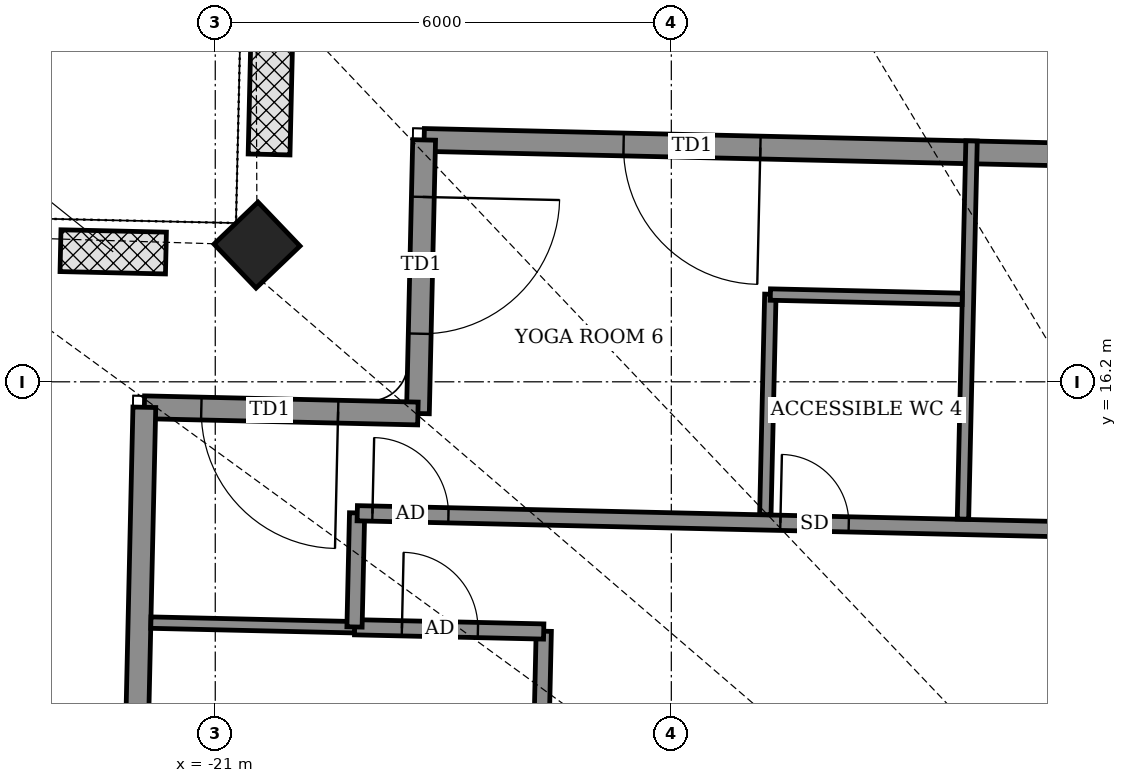
"""IFC4 building model, lengths in metres.
Left out: names, types, materials, properties, quantities, classifications, styles, units other than length and angle.
Written with IfcOpenShell. Run it as: python <this file> out.ifc"""

import sys

from ifc_helpers import new_model, si_unit, direction, frame, frame_2d, origin, origin_2d, place, context, subcontext, project, spatial, rectangle, extrude, element, fill, save


model = new_model("IFC4")
c1 = context("Model", 3, precision=1e-05, world=origin(), true_north=direction((0.0, 1.0)))
c2 = subcontext(c1, "Body", "Model", "MODEL_VIEW")
j1 = project(units=[si_unit("LENGTHUNIT", "METRE"), si_unit("PLANEANGLEUNIT", "RADIAN")], contexts=[c1])
p1 = place(None, origin())
s1 = spatial("IfcSite", under=j1, at=p1, CompositionType="ELEMENT")
p2 = place(p1, origin())
s2 = spatial("IfcBuilding", under=s1, at=p2, CompositionType="ELEMENT")
p3 = place(p2, frame((0.0, 0.0, 346.1)))
s3 = spatial("IfcBuildingStorey", under=s2, at=p3, CompositionType="ELEMENT", Elevation=346.1)
p4 = place(p3, frame((-20.451, 17.999, -0.55), z_axis=(0.0, 0.0, 1.0), x_axis=(-0.722928727453, -0.690922611457, 0.0)))
e1 = element("IfcColumn", 1, at=p4, inside=s3, PredefinedType="COLUMN", context=c2, shape_type="SweptSolid", body=[
    extrude(rectangle(XDim=0.8, YDim=0.8, at=origin_2d()), origin(), (0.0, 0.0, 1.0), 4.6),
])
p5 = place(p3, frame((23.537, 18.434, 0.0), z_axis=(0.0, 0.0, 1.0), x_axis=(-0.999742787513, 0.022679480066, 0.0)))
e2 = element("IfcWall", 2, at=p5, inside=s3, PredefinedType="SOLIDWALL", context=c2, shape_type="SweptSolid", body=[
    extrude(rectangle(XDim=41.8, YDim=0.3, at=frame_2d((20.9, 0.0))), origin(), (0.0, 0.0, 1.0), 2.65),
])
p6 = place(p5, frame((3.0, 0.0, 0.0)))
e3 = element("IfcOpeningElement", 3, at=p6, cuts=e2, PredefinedType="OPENING", context=c2, shape_type="SweptSolid", body=[
    extrude(rectangle(XDim=1.8, YDim=2.4, at=frame_2d((0.9, 1.2))), frame((0.0, 0.16, 0.0), z_axis=(0.0, -1.0, 0.0), x_axis=(1.0, 0.0, 0.0)), (0.0, 0.0, 1.0), 0.32),
])
p7 = place(p5, frame((10.325, 0.0, 0.0)))
e4 = element("IfcOpeningElement", 4, at=p7, cuts=e2, PredefinedType="OPENING", context=c2, shape_type="SweptSolid", body=[
    extrude(rectangle(XDim=1.8, YDim=2.4, at=frame_2d((0.9, 1.2))), frame((0.0, 0.16, 0.0), z_axis=(0.0, -1.0, 0.0), x_axis=(1.0, 0.0, 0.0)), (0.0, 0.0, 1.0), 0.32),
])
p8 = place(p5, frame((18.025, 0.0, 0.0)))
e5 = element("IfcOpeningElement", 5, at=p8, cuts=e2, PredefinedType="OPENING", context=c2, shape_type="SweptSolid", body=[
    extrude(rectangle(XDim=1.8, YDim=2.4, at=frame_2d((0.9, 1.2))), frame((0.0, 0.16, 0.0), z_axis=(0.0, -1.0, 0.0), x_axis=(1.0, 0.0, 0.0)), (0.0, 0.0, 1.0), 0.32),
])
p9 = place(p5, frame((24.025, 0.0, 0.0)))
e6 = element("IfcOpeningElement", 6, at=p9, cuts=e2, PredefinedType="OPENING", context=c2, shape_type="SweptSolid", body=[
    extrude(rectangle(XDim=1.8, YDim=2.4, at=frame_2d((0.9, 1.2))), frame((0.0, 0.16, 0.0), z_axis=(0.0, -1.0, 0.0), x_axis=(1.0, 0.0, 0.0)), (0.0, 0.0, 1.0), 0.32),
])
p10 = place(p5, frame((30.05, 0.0, 0.0)))
e7 = element("IfcOpeningElement", 7, at=p10, cuts=e2, PredefinedType="OPENING", context=c2, shape_type="SweptSolid", body=[
    extrude(rectangle(XDim=1.8, YDim=2.4, at=frame_2d((0.9, 1.2))), frame((0.0, 0.16, 0.0), z_axis=(0.0, -1.0, 0.0), x_axis=(1.0, 0.0, 0.0)), (0.0, 0.0, 1.0), 0.32),
])
p11 = place(p5, frame((37.375, 0.0, 0.0)))
e8 = element("IfcOpeningElement", 8, at=p11, cuts=e2, PredefinedType="OPENING", context=c2, shape_type="SweptSolid", body=[
    extrude(rectangle(XDim=1.8, YDim=2.4, at=frame_2d((0.9, 1.2))), frame((0.0, 0.16, 0.0), z_axis=(0.0, -1.0, 0.0), x_axis=(1.0, 0.0, 0.0)), (0.0, 0.0, 1.0), 0.32),
])
p12 = place(p3, frame((-18.252, 19.382, 0.0), z_axis=(0.0, 0.0, 1.0), x_axis=(-0.02278610514, -0.999740363001, 0.0)))
e9 = element("IfcWall", 9, at=p12, inside=s3, PredefinedType="SOLIDWALL", context=c2, shape_type="SweptSolid", body=[
    extrude(rectangle(XDim=3.6, YDim=0.3, at=frame_2d((1.8, 0.0))), origin(), (0.0, 0.0, 1.0), 2.65),
])
p13 = place(p12, frame((0.75, 0.0, 0.0)))
e10 = element("IfcOpeningElement", 10, at=p13, cuts=e9, PredefinedType="OPENING", context=c2, shape_type="SweptSolid", body=[
    extrude(rectangle(XDim=1.8, YDim=2.4, at=frame_2d((0.9, 1.2))), frame((0.0, 0.16, 0.0), z_axis=(0.0, -1.0, 0.0), x_axis=(1.0, 0.0, 0.0)), (0.0, 0.0, 1.0), 0.32),
])
p14 = place(p3, frame((-18.334, 15.783, 0.0), z_axis=(0.0, 0.0, 1.0), x_axis=(-0.999740363001, 0.02278610514, 0.0)))
e11 = element("IfcWall", 11, at=p14, inside=s3, PredefinedType="SOLIDWALL", context=c2, shape_type="SweptSolid", body=[
    extrude(rectangle(XDim=3.6, YDim=0.3, at=frame_2d((1.8, 0.0))), origin(), (0.0, 0.0, 1.0), 2.75),
])
p15 = place(p14, frame((1.05, 0.0, 0.0)))
e12 = element("IfcOpeningElement", 12, at=p15, cuts=e11, PredefinedType="OPENING", context=c2, shape_type="SweptSolid", body=[
    extrude(rectangle(XDim=1.8, YDim=2.4, at=frame_2d((0.9, 1.2))), frame((0.0, 0.16, 0.0), z_axis=(0.0, -1.0, 0.0), x_axis=(1.0, 0.0, 0.0)), (0.0, 0.0, 1.0), 0.32),
])
p16 = place(p3, frame((-21.933, 15.865, 0.0), z_axis=(0.0, 0.0, 1.0), x_axis=(-0.022653381007, -0.999743379237, 0.0)))
e13 = element("IfcWall", 13, at=p16, inside=s3, PredefinedType="SOLIDWALL", context=c2, shape_type="SweptSolid", body=[
    extrude(rectangle(XDim=6.93, YDim=0.3, at=frame_2d((3.465, 0.0))), origin(), (0.0, 0.0, 1.0), 2.75),
])
p17 = place(p16, frame((3.95, 0.0, 0.0)))
e14 = element("IfcOpeningElement", 14, at=p17, cuts=e13, PredefinedType="OPENING", context=c2, shape_type="SweptSolid", body=[
    extrude(rectangle(XDim=1.8, YDim=2.4, at=frame_2d((0.9, 1.2))), frame((0.0, 0.16, 0.0), z_axis=(0.0, -1.0, 0.0), x_axis=(1.0, 0.0, 0.0)), (0.0, 0.0, 1.0), 0.32),
])
p18 = place(p3, frame((-23.036, 17.925, 0.0), z_axis=(0.0, 0.0, 1.0), x_axis=(0.999750215708, -0.022349635169, 0.0)))
e15 = element("IfcWall", 15, at=p18, inside=s3, PredefinedType="USERDEFINED", context=c2, shape_type="SweptSolid", body=[
    extrude(rectangle(XDim=1.387, YDim=0.55, at=frame_2d((0.694, 0.0))), origin(), (0.0, 0.0, 1.0), 0.8),
])
p19 = place(p3, frame((-20.292, 19.191, 0.0), z_axis=(0.0, 0.0, 1.0), x_axis=(0.022929749512, 0.99973707873, 0.0)))
e16 = element("IfcWall", 16, at=p19, inside=s3, PredefinedType="USERDEFINED", context=c2, shape_type="SweptSolid", body=[
    extrude(rectangle(XDim=1.438, YDim=0.55, at=frame_2d((0.719, 0.0))), origin(), (0.0, 0.0, 1.0), 0.8),
])
p20 = place(p3, frame((-19.301, 21.642, 0.0), z_axis=(0.0, 0.0, 1.0), x_axis=(0.999742269674, -0.022702295639, 0.0)))
e17 = element("IfcWall", 17, at=p20, inside=s3, PredefinedType="USERDEFINED", context=c2, shape_type="SweptSolid", body=[
    extrude(rectangle(XDim=41.5, YDim=0.55, at=frame_2d((20.75, 0.0))), origin(), (0.0, 0.0, 1.0), 0.8),
])
p21 = place(p3, frame((-17.247, -12.149, 0.0), z_axis=(0.0, 0.0, 1.0), x_axis=(0.022696191528, 0.999742408268, 0.0)))
e18 = element("IfcWall", 18, at=p21, inside=s3, PredefinedType="PARTITIONING", context=c2, shape_type="SweptSolid", body=[
    extrude(rectangle(XDim=25.074, YDim=0.2, at=frame_2d((12.537, 0.0))), origin(), (0.0, 0.0, 1.0), 2.75),
])
p22 = place(p21, frame((17.425, 0.0, 0.0)))
e19 = element("IfcOpeningElement", 19, at=p22, cuts=e18, PredefinedType="OPENING", context=c2, shape_type="SweptSolid", body=[
    extrude(rectangle(XDim=1.0, YDim=2.1, at=frame_2d((0.5, 1.05))), frame((0.0, 0.11, 0.0), z_axis=(0.0, -1.0, 0.0), x_axis=(1.0, 0.0, 0.0)), (0.0, 0.0, 1.0), 0.22),
])
p23 = place(p21, frame((19.925, 0.0, 0.0)))
e20 = element("IfcOpeningElement", 20, at=p23, cuts=e18, PredefinedType="OPENING", context=c2, shape_type="SweptSolid", body=[
    extrude(rectangle(XDim=0.9, YDim=2.1, at=frame_2d((0.45, 1.05))), frame((0.0, 0.11, 0.0), z_axis=(0.0, -1.0, 0.0), x_axis=(1.0, 0.0, 0.0)), (0.0, 0.0, 1.0), 0.22),
])
p24 = place(p21, frame((12.175, 0.0, 0.0)))
e21 = element("IfcOpeningElement", 21, at=p24, cuts=e18, PredefinedType="OPENING", context=c2, shape_type="SweptSolid", body=[
    extrude(rectangle(XDim=1.0, YDim=2.1, at=frame_2d((0.5, 1.05))), frame((0.0, 0.11, 0.0), z_axis=(0.0, -1.0, 0.0), x_axis=(1.0, 0.0, 0.0)), (0.0, 0.0, 1.0), 0.22),
])
p25 = place(p21, frame((8.575, 0.0, 0.0)))
e22 = element("IfcOpeningElement", 22, at=p25, cuts=e18, PredefinedType="OPENING", context=c2, shape_type="SweptSolid", body=[
    extrude(rectangle(XDim=0.9, YDim=2.1, at=frame_2d((0.45, 1.05))), frame((0.0, 0.11, 0.0), z_axis=(0.0, -1.0, 0.0), x_axis=(1.0, 0.0, 0.0)), (0.0, 0.0, 1.0), 0.22),
])
p26 = place(p21, frame((4.259, 0.0, 0.0)))
e23 = element("IfcOpeningElement", 23, at=p26, cuts=e18, PredefinedType="OPENING", context=c2, shape_type="SweptSolid", body=[
    extrude(rectangle(XDim=1.0, YDim=2.1, at=frame_2d((0.5, 1.05))), frame((0.0, 0.11, 0.0), z_axis=(0.0, -1.0, 0.0), x_axis=(1.0, 0.0, 0.0)), (0.0, 0.0, 1.0), 0.22),
])
p27 = place(p3, frame((-21.847, 13.032, 0.0), z_axis=(0.0, 0.0, 1.0), x_axis=(0.999741694725, -0.022727600589, 0.0)))
e24 = element("IfcWall", 24, at=p27, inside=s3, PredefinedType="PARTITIONING", context=c2, shape_type="SweptSolid", body=[
    extrude(rectangle(XDim=2.686, YDim=0.15, at=frame_2d((1.343, 0.0))), origin(), (0.0, 0.0, 1.0), 4.05),
])
p28 = place(p3, frame((-19.166, 12.971, 0.0), z_axis=(0.0, 0.0, 1.0), x_axis=(0.999747428818, -0.022473953195, 0.0)))
e25 = element("IfcWall", 25, at=p28, inside=s3, PredefinedType="PARTITIONING", context=c2, shape_type="SweptSolid", body=[
    extrude(rectangle(XDim=2.488, YDim=0.2, at=frame_2d((1.244, 0.0))), origin(), (0.0, 0.0, 1.0), 2.75),
])
p29 = place(p28, frame((0.622, 0.0, 0.0)))
e26 = element("IfcOpeningElement", 26, at=p29, cuts=e25, PredefinedType="OPENING", context=c2, shape_type="SweptSolid", body=[
    extrude(rectangle(XDim=1.0, YDim=2.1, at=frame_2d((0.5, 1.05))), frame((0.0, 0.11, 0.0), z_axis=(0.0, -1.0, 0.0), x_axis=(1.0, 0.0, 0.0)), (0.0, 0.0, 1.0), 0.22),
])
p30 = place(p3, frame((-19.168, 12.975, 0.0), z_axis=(0.0, 0.0, 1.0), x_axis=(0.022617910375, 0.999744182344, 0.0)))
e27 = element("IfcWall", 27, at=p30, inside=s3, PredefinedType="PARTITIONING", context=c2, shape_type="SweptSolid", body=[
    extrude(rectangle(XDim=1.5, YDim=0.2, at=frame_2d((0.75, 0.0))), origin(), (0.0, 0.0, 1.0), 2.75),
])
p31 = place(p3, frame((-19.132, 14.471, 0.0), z_axis=(0.0, 0.0, 1.0), x_axis=(0.999742846934, -0.022676860534, 0.0)))
e28 = element("IfcWall", 28, at=p31, inside=s3, PredefinedType="PARTITIONING", context=c2, shape_type="SweptSolid", body=[
    extrude(rectangle(XDim=40.836, YDim=0.2, at=frame_2d((20.418, 0.0))), origin(), (0.0, 0.0, 1.0), 2.55),
])
p32 = place(p31, frame((37.108, 0.0, 0.0)))
e29 = element("IfcOpeningElement", 29, at=p32, cuts=e28, PredefinedType="OPENING", context=c2, shape_type="SweptSolid", body=[
    extrude(rectangle(XDim=1.0, YDim=2.1, at=frame_2d((0.5, 1.05))), frame((0.0, 0.11, 0.0), z_axis=(0.0, -1.0, 0.0), x_axis=(1.0, 0.0, 0.0)), (0.0, 0.0, 1.0), 0.22),
])
p33 = place(p31, frame((28.372, 0.0, 0.0)))
e30 = element("IfcOpeningElement", 30, at=p33, cuts=e28, PredefinedType="OPENING", context=c2, shape_type="SweptSolid", body=[
    extrude(rectangle(XDim=1.0, YDim=2.1, at=frame_2d((0.5, 1.05))), frame((0.0, 0.11, 0.0), z_axis=(0.0, -1.0, 0.0), x_axis=(1.0, 0.0, 0.0)), (0.0, 0.0, 1.0), 0.22),
])
p34 = place(p31, frame((33.218, 0.0, 0.0)))
e31 = element("IfcOpeningElement", 31, at=p34, cuts=e28, PredefinedType="OPENING", context=c2, shape_type="SweptSolid", body=[
    extrude(rectangle(XDim=0.9, YDim=2.1, at=frame_2d((0.45, 1.05))), frame((0.0, 0.11, 0.0), z_axis=(0.0, -1.0, 0.0), x_axis=(1.0, 0.0, 0.0)), (0.0, 0.0, 1.0), 0.22),
])
p35 = place(p31, frame((21.823, 0.0, 0.0)))
e32 = element("IfcOpeningElement", 32, at=p35, cuts=e28, PredefinedType="OPENING", context=c2, shape_type="SweptSolid", body=[
    extrude(rectangle(XDim=1.0, YDim=2.1, at=frame_2d((0.5, 1.05))), frame((0.0, 0.11, 0.0), z_axis=(0.0, -1.0, 0.0), x_axis=(1.0, 0.0, 0.0)), (0.0, 0.0, 1.0), 0.22),
])
p36 = place(p31, frame((15.468, 0.0, 0.0)))
e33 = element("IfcOpeningElement", 33, at=p36, cuts=e28, PredefinedType="OPENING", context=c2, shape_type="SweptSolid", body=[
    extrude(rectangle(XDim=1.0, YDim=2.1, at=frame_2d((0.5, 1.05))), frame((0.0, 0.11, 0.0), z_axis=(0.0, -1.0, 0.0), x_axis=(1.0, 0.0, 0.0)), (0.0, 0.0, 1.0), 0.22),
])
p37 = place(p31, frame((17.618, 0.0, 0.0)))
e34 = element("IfcOpeningElement", 34, at=p37, cuts=e28, PredefinedType="OPENING", context=c2, shape_type="SweptSolid", body=[
    extrude(rectangle(XDim=0.9, YDim=2.1, at=frame_2d((0.45, 1.05))), frame((0.0, 0.11, 0.0), z_axis=(0.0, -1.0, 0.0), x_axis=(1.0, 0.0, 0.0)), (0.0, 0.0, 1.0), 0.22),
])
p38 = place(p31, frame((9.852, 0.0, 0.0)))
e35 = element("IfcOpeningElement", 35, at=p38, cuts=e28, PredefinedType="OPENING", context=c2, shape_type="SweptSolid", body=[
    extrude(rectangle(XDim=1.0, YDim=2.1, at=frame_2d((0.5, 1.05))), frame((0.0, 0.11, 0.0), z_axis=(0.0, -1.0, 0.0), x_axis=(1.0, 0.0, 0.0)), (0.0, 0.0, 1.0), 0.22),
])
p39 = place(p31, frame((0.2, 0.0, 0.0)))
e36 = element("IfcOpeningElement", 36, at=p39, cuts=e28, PredefinedType="OPENING", context=c2, shape_type="SweptSolid", body=[
    extrude(rectangle(XDim=1.0, YDim=2.1, at=frame_2d((0.5, 1.05))), frame((0.0, 0.11, 0.0), z_axis=(0.0, -1.0, 0.0), x_axis=(1.0, 0.0, 0.0)), (0.0, 0.0, 1.0), 0.22),
])
p40 = place(p31, frame((5.568, 0.0, 0.0)))
e37 = element("IfcOpeningElement", 37, at=p40, cuts=e28, PredefinedType="OPENING", context=c2, shape_type="SweptSolid", body=[
    extrude(rectangle(XDim=0.9, YDim=2.1, at=frame_2d((0.45, 1.05))), frame((0.0, 0.11, 0.0), z_axis=(0.0, -1.0, 0.0), x_axis=(1.0, 0.0, 0.0)), (0.0, 0.0, 1.0), 0.22),
])
p41 = place(p3, frame((-13.763, 14.453, 0.0), z_axis=(0.0, 0.0, 1.0), x_axis=(0.022730967319, 0.999741618182, 0.0)))
e38 = element("IfcWall", 38, at=p41, inside=s3, PredefinedType="PARTITIONING", context=c2, shape_type="SweptSolid", body=[
    extrude(rectangle(XDim=2.9, YDim=0.15, at=frame_2d((1.45, 0.0))), origin(), (0.0, 0.0, 1.0), 2.65),
])
p42 = place(p3, frame((-11.163, 14.394, 0.0), z_axis=(0.0, 0.0, 1.0), x_axis=(0.022715832973, 0.999741962174, 0.0)))
e39 = element("IfcWall", 39, at=p42, inside=s3, PredefinedType="PARTITIONING", context=c2, shape_type="SweptSolid", body=[
    extrude(rectangle(XDim=4.976, YDim=0.15, at=frame_2d((2.488, 0.0))), origin(), (0.0, 0.0, 1.0), 2.85),
])
p43 = place(p3, frame((-13.697, 17.348, 0.0), z_axis=(0.0, 0.0, 1.0), x_axis=(0.9997461113, -0.022532486354, 0.0)))
e40 = element("IfcWall", 40, at=p43, inside=s3, PredefinedType="PARTITIONING", context=c2, shape_type="SweptSolid", body=[
    extrude(rectangle(XDim=2.525, YDim=0.15, at=frame_2d((1.262, 0.0))), origin(), (0.0, 0.0, 1.0), 2.85),
])
p44 = place(p11, origin())
e41 = element("IfcDoor", 41, at=p44, inside=s3, OperationType="DOUBLE_DOOR_SINGLE_SWING", PredefinedType="DOOR", context=c2, shape_type="SweptSolid", body=[
    extrude(rectangle(XDim=1.8, YDim=2.4, at=frame_2d((0.9, 1.2))), frame((0.0, 0.025, 0.0), z_axis=(0.0, -1.0, 0.0), x_axis=(1.0, 0.0, 0.0)), (0.0, 0.0, 1.0), 0.05),
])
fill(e8, e41)
p45 = place(p13, origin())
e42 = element("IfcDoor", 42, at=p45, inside=s3, OperationType="DOUBLE_DOOR_SINGLE_SWING", PredefinedType="DOOR", context=c2, shape_type="SweptSolid", body=[
    extrude(rectangle(XDim=1.8, YDim=2.4, at=frame_2d((0.9, 1.2))), frame((0.0, 0.025, 0.0), z_axis=(0.0, -1.0, 0.0), x_axis=(1.0, 0.0, 0.0)), (0.0, 0.0, 1.0), 0.05),
])
fill(e10, e42)
p46 = place(p15, origin())
e43 = element("IfcDoor", 43, at=p46, inside=s3, OperationType="DOUBLE_DOOR_SINGLE_SWING", PredefinedType="DOOR", context=c2, shape_type="SweptSolid", body=[
    extrude(rectangle(XDim=1.8, YDim=2.4, at=frame_2d((0.9, 1.2))), frame((0.0, 0.025, 0.0), z_axis=(0.0, -1.0, 0.0), x_axis=(1.0, 0.0, 0.0)), (0.0, 0.0, 1.0), 0.05),
])
fill(e12, e43)
p47 = place(p39, origin())
e44 = element("IfcDoor", 44, at=p47, inside=s3, OperationType="SINGLE_SWING_RIGHT", PredefinedType="DOOR", context=c2, shape_type="SweptSolid", body=[
    extrude(rectangle(XDim=1.0, YDim=2.1, at=frame_2d((0.5, 1.05))), frame((0.0, 0.025, 0.0), z_axis=(0.0, -1.0, 0.0), x_axis=(1.0, 0.0, 0.0)), (0.0, 0.0, 1.0), 0.05),
])
fill(e36, e44)
p48 = place(p40, origin())
e45 = element("IfcDoor", 45, at=p48, inside=s3, OperationType="SINGLE_SWING_LEFT", PredefinedType="DOOR", context=c2, shape_type="SweptSolid", body=[
    extrude(rectangle(XDim=0.9, YDim=2.1, at=frame_2d((0.45, 1.05))), frame((0.0, 0.025, 0.0), z_axis=(0.0, -1.0, 0.0), x_axis=(1.0, 0.0, 0.0)), (0.0, 0.0, 1.0), 0.05),
])
fill(e37, e45)
p49 = place(p29, origin())
e46 = element("IfcDoor", 46, at=p49, inside=s3, OperationType="SINGLE_SWING_LEFT", PredefinedType="DOOR", context=c2, shape_type="SweptSolid", body=[
    extrude(rectangle(XDim=1.0, YDim=2.1, at=frame_2d((0.5, 1.05))), frame((0.0, 0.025, 0.0), z_axis=(0.0, -1.0, 0.0), x_axis=(1.0, 0.0, 0.0)), (0.0, 0.0, 1.0), 0.05),
])
fill(e26, e46)
save(model, sys.argv[1])
